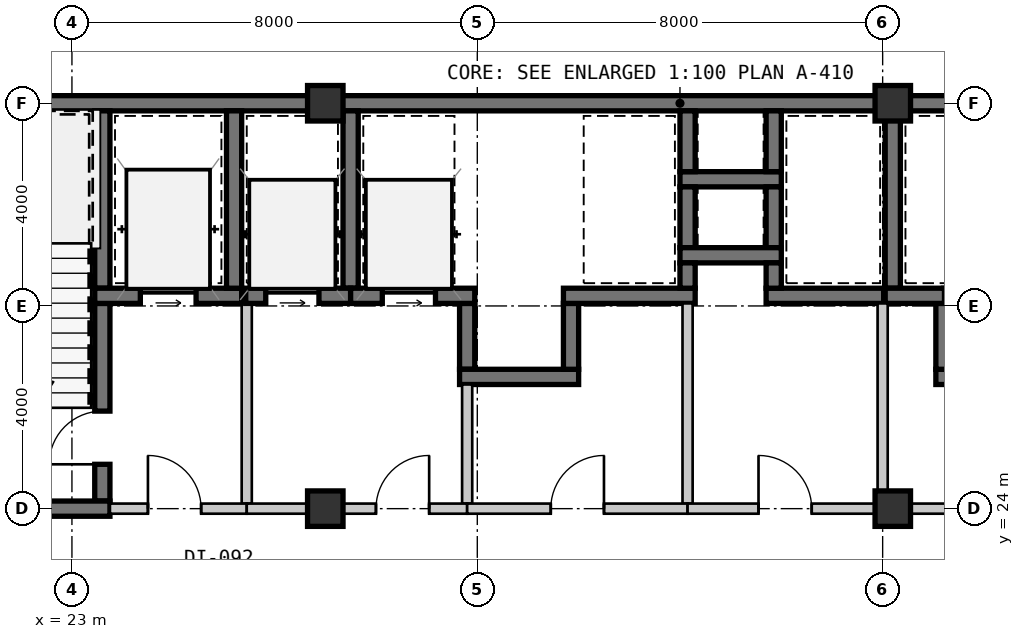
"""IFC4 building model, lengths in metres.
Left out: names, types, materials, properties, quantities, classifications, styles, units other than length and angle.
Written with IfcOpenShell. Run it as: python <this file> out.ifc"""

import sys

from ifc_helpers import new_model, si_unit, direction, frame, frame_2d, origin, origin_2d, place, context, subcontext, project, spatial, rectangle, extrude, source, transform, mapped, element, fill, save


model = new_model("IFC4")
c1 = context("Model", 3, precision=1e-05, world=origin(), true_north=direction((0.0, 1.0)))
c2 = subcontext(c1, "Body", "Model", "MODEL_VIEW")
j1 = project(units=[si_unit("LENGTHUNIT", "METRE"), si_unit("PLANEANGLEUNIT", "RADIAN")], contexts=[c1])
p1 = place(None, origin())
s1 = spatial("IfcSite", under=j1, at=p1, CompositionType="ELEMENT")
p2 = place(p1, origin())
s2 = spatial("IfcBuilding", under=s1, at=p2, CompositionType="ELEMENT")
p3 = place(p2, frame((0.0, 0.0, 74.55)))
s3 = spatial("IfcBuildingStorey", under=s2, at=p3, CompositionType="ELEMENT", Elevation=74.55)
m1 = source(origin(), c2, "Body", "SweptSolid", [
    extrude(rectangle(XDim=0.7, YDim=0.7, at=origin_2d()), origin(), (0.0, 0.0, 1.0), 3.15),
])
for number, where, z_axis, x_axis in (
    (1, (28.0, 24.0, 0.0), (0.0, 0.0, 1.0), (1.0, 0.0, 0.0)),
    (2, (39.2, 24.0, 0.0), (0.0, 0.0, 1.0), (1.0, 0.0, 0.0)),
    (3, (28.0, 32.0, 0.0), (0.0, 0.0, 1.0), (1.0, 0.0, 0.0)),
    (4, (39.2, 32.0, 0.0), (0.0, 0.0, 1.0), (1.0, 0.0, 0.0)),
):
    element("IfcColumn", number, at=place(p3, frame(where, z_axis=z_axis, x_axis=x_axis)), inside=s3, PredefinedType="COLUMN", context=c2, shape_type="MappedRepresentation", body=[
        mapped(m1, transform((0.0, 0.0, 0.0), scale=1.0)),
    ])
m2 = source(origin(), c2, "Body", "SweptSolid", [
    extrude(rectangle(XDim=9.15, YDim=0.3, at=frame_2d((4.575, 0.0))), origin(), (0.0, 0.0, 1.0), 2.93),
])
p4 = place(p3, frame((18.85, 32.0, 0.0), z_axis=(0.0, 0.0, 1.0), x_axis=(1.0, 0.0, 0.0)))
e5 = element("IfcWall", 5, at=p4, inside=s3, PredefinedType="SHEAR", context=c2, shape_type="MappedRepresentation", body=[
    mapped(m2, transform((0.0, 0.0, 0.0), scale=1.0)),
])
m3 = source(origin(), c2, "Body", "SweptSolid", [
    extrude(rectangle(XDim=11.2, YDim=0.3, at=frame_2d((5.6, 0.0))), origin(), (0.0, 0.0, 1.0), 2.93),
])
p5 = place(p3, frame((28.0, 32.0, 0.0), z_axis=(0.0, 0.0, 1.0), x_axis=(1.0, 0.0, 0.0)))
e6 = element("IfcWall", 6, at=p5, inside=s3, PredefinedType="SHEAR", context=c2, shape_type="MappedRepresentation", body=[
    mapped(m3, transform((0.0, 0.0, 0.0), scale=1.0)),
])
m4 = source(origin(), c2, "Body", "SweptSolid", [
    extrude(rectangle(XDim=11.95, YDim=0.3, at=frame_2d((5.975, 0.0))), origin(), (0.0, 0.0, 1.0), 2.93),
])
p6 = place(p3, frame((39.2, 32.0, 0.0), z_axis=(0.0, 0.0, 1.0), x_axis=(1.0, 0.0, 0.0)))
e7 = element("IfcWall", 7, at=p6, inside=s3, PredefinedType="SHEAR", context=c2, shape_type="MappedRepresentation", body=[
    mapped(m4, transform((0.0, 0.0, 0.0), scale=1.0)),
])
m5 = source(origin(), c2, "Body", "SweptSolid", [
    extrude(rectangle(XDim=3.5, YDim=0.3, at=frame_2d((1.75, 0.0))), origin(), (0.0, 0.0, 1.0), 2.93),
])
p7 = place(p3, frame((23.6, 28.35, 0.0), z_axis=(0.0, 0.0, 1.0), x_axis=(0.0, 1.0, 0.0)))
e8 = element("IfcWall", 8, at=p7, inside=s3, PredefinedType="SHEAR", context=c2, shape_type="MappedRepresentation", body=[
    mapped(m5, transform((0.0, 0.0, 0.0), scale=1.0)),
])
m6 = source(origin(), c2, "Body", "SweptSolid", [
    extrude(rectangle(XDim=3.9, YDim=0.3, at=frame_2d((1.95, 0.0))), origin(), (0.0, 0.0, 1.0), 2.93),
])
p8 = place(p3, frame((23.6, 24.15, 0.0), z_axis=(0.0, 0.0, 1.0), x_axis=(0.0, 1.0, 0.0)))
e9 = element("IfcWall", 9, at=p8, inside=s3, PredefinedType="SHEAR", context=c2, shape_type="MappedRepresentation", body=[
    mapped(m6, transform((0.0, 0.0, 0.0), scale=1.0)),
])
m7 = source(origin(), c2, "Body", "SweptSolid", [
    extrude(rectangle(XDim=1.05, YDim=2.1, at=frame_2d((0.525, 1.05))), frame((0.0, 0.16, 0.0), z_axis=(0.0, -1.0, 0.0), x_axis=(1.0, 0.0, 0.0)), (0.0, 0.0, 1.0), 0.32),
])
p9 = place(p8, frame((0.725, 0.0, 0.0)))
e10 = element("IfcOpeningElement", 10, at=p9, cuts=e9, PredefinedType="OPENING", context=c2, shape_type="MappedRepresentation", body=[
    mapped(m7, transform((0.0, 0.0, 0.0), scale=1.0)),
])
m8 = source(origin(), c2, "Body", "SweptSolid", [
    extrude(rectangle(XDim=4.9, YDim=0.3, at=frame_2d((2.45, 0.0))), origin(), (0.0, 0.0, 1.0), 2.93),
])
p10 = place(p3, frame((18.85, 24.0, 0.0), z_axis=(0.0, 0.0, 1.0), x_axis=(1.0, 0.0, 0.0)))
e11 = element("IfcWall", 11, at=p10, inside=s3, PredefinedType="SHEAR", context=c2, shape_type="MappedRepresentation", body=[
    mapped(m8, transform((0.0, 0.0, 0.0), scale=1.0)),
])
m9 = source(origin(), c2, "Body", "SweptSolid", [
    extrude(rectangle(XDim=2.9, YDim=0.3, at=frame_2d((1.45, 0.0))), origin(), (0.0, 0.0, 1.0), 2.93),
])
p11 = place(p3, frame((23.45, 28.2, 0.0), z_axis=(0.0, 0.0, 1.0), x_axis=(1.0, 0.0, 0.0)))
e12 = element("IfcWall", 12, at=p11, inside=s3, PredefinedType="SHEAR", context=c2, shape_type="MappedRepresentation", body=[
    mapped(m9, transform((0.0, 0.0, 0.0), scale=1.0)),
])
m10 = source(origin(), c2, "Body", "SweptSolid", [
    extrude(rectangle(XDim=1.1, YDim=2.15, at=frame_2d((0.55, 1.075))), frame((0.0, 0.16, 0.0), z_axis=(0.0, -1.0, 0.0), x_axis=(1.0, 0.0, 0.0)), (0.0, 0.0, 1.0), 0.32),
])
p12 = place(p11, frame((0.9, 0.0, 0.0)))
e13 = element("IfcOpeningElement", 13, at=p12, cuts=e12, PredefinedType="OPENING", context=c2, shape_type="MappedRepresentation", body=[
    mapped(m10, transform((0.0, 0.0, 0.0), scale=1.0)),
])
p13 = place(p3, frame((26.2, 28.35, 0.0), z_axis=(0.0, 0.0, 1.0), x_axis=(0.0, 1.0, 0.0)))
e14 = element("IfcWall", 14, at=p13, inside=s3, PredefinedType="SHEAR", context=c2, shape_type="MappedRepresentation", body=[
    mapped(m5, transform((0.0, 0.0, 0.0), scale=1.0)),
])
m11 = source(origin(), c2, "Body", "SweptSolid", [
    extrude(rectangle(XDim=3.95, YDim=0.2, at=frame_2d((1.975, 0.0))), origin(), (0.0, 0.0, 1.0), 2.93),
])
p14 = place(p3, frame((26.45, 24.1, 0.0), z_axis=(0.0, 0.0, 1.0), x_axis=(0.0, 1.0, 0.0)))
e15 = element("IfcWall", 15, at=p14, inside=s3, PredefinedType="SOLIDWALL", context=c2, shape_type="MappedRepresentation", body=[
    mapped(m11, transform((0.0, 0.0, 0.0), scale=1.0)),
])
m12 = source(origin(), c2, "Body", "SweptSolid", [
    extrude(rectangle(XDim=2.7, YDim=0.2, at=frame_2d((1.35, 0.0))), origin(), (0.0, 0.0, 1.0), 2.47),
])
p15 = place(p3, frame((23.75, 24.0, 0.0), z_axis=(0.0, 0.0, 1.0), x_axis=(1.0, 0.0, 0.0)))
e16 = element("IfcWall", 16, at=p15, inside=s3, PredefinedType="SOLIDWALL", context=c2, shape_type="MappedRepresentation", body=[
    mapped(m12, transform((0.0, 0.0, 0.0), scale=1.0)),
])
m13 = source(origin(), c2, "Body", "SweptSolid", [
    extrude(rectangle(XDim=1.05, YDim=2.1, at=frame_2d((0.525, 1.05))), frame((0.0, 0.11, 0.0), z_axis=(0.0, -1.0, 0.0), x_axis=(1.0, 0.0, 0.0)), (0.0, 0.0, 1.0), 0.22),
])
p16 = place(p15, frame((0.75, 0.0, 0.0)))
e17 = element("IfcOpeningElement", 17, at=p16, cuts=e16, PredefinedType="OPENING", context=c2, shape_type="MappedRepresentation", body=[
    mapped(m13, transform((0.0, 0.0, 0.0), scale=1.0)),
])
m14 = source(origin(), c2, "Body", "SweptSolid", [
    extrude(rectangle(XDim=2.0, YDim=0.3, at=frame_2d((1.0, 0.0))), origin(), (0.0, 0.0, 1.0), 2.93),
])
p17 = place(p3, frame((35.0, 30.5, 0.0), z_axis=(0.0, 0.0, 1.0), x_axis=(1.0, 0.0, 0.0)))
e18 = element("IfcWall", 18, at=p17, inside=s3, PredefinedType="SHEAR", context=c2, shape_type="MappedRepresentation", body=[
    mapped(m14, transform((0.0, 0.0, 0.0), scale=1.0)),
])
m15 = source(origin(), c2, "Body", "SweptSolid", [
    extrude(rectangle(XDim=1.2, YDim=0.3, at=frame_2d((0.6, 0.0))), origin(), (0.0, 0.0, 1.0), 2.93),
])
for number, where, z_axis, x_axis in (
    (19, (35.15, 31.85, 0.0), (0.0, 0.0, 1.0), (0.0, -1.0, 0.0)),
    (20, (36.85, 30.65, 0.0), (0.0, 0.0, 1.0), (0.0, 1.0, 0.0)),
    (21, (35.15, 30.35, 0.0), (0.0, 0.0, 1.0), (0.0, -1.0, 0.0)),
    (22, (36.85, 29.15, 0.0), (0.0, 0.0, 1.0), (0.0, 1.0, 0.0)),
):
    element("IfcWall", number, at=place(p3, frame(where, z_axis=z_axis, x_axis=x_axis)), inside=s3, PredefinedType="SHEAR", context=c2, shape_type="MappedRepresentation", body=[
        mapped(m15, transform((0.0, 0.0, 0.0), scale=1.0)),
    ])
p18 = place(p3, frame((35.0, 29.0, 0.0), z_axis=(0.0, 0.0, 1.0), x_axis=(1.0, 0.0, 0.0)))
e23 = element("IfcWall", 23, at=p18, inside=s3, PredefinedType="SHEAR", context=c2, shape_type="MappedRepresentation", body=[
    mapped(m14, transform((0.0, 0.0, 0.0), scale=1.0)),
])
m16 = source(origin(), c2, "Body", "SweptSolid", [
    extrude(rectangle(XDim=1.3, YDim=0.3, at=frame_2d((0.65, 0.0))), origin(), (0.0, 0.0, 1.0), 2.93),
])
p19 = place(p3, frame((30.8, 28.05, 0.0), z_axis=(0.0, 0.0, 1.0), x_axis=(0.0, -1.0, 0.0)))
e24 = element("IfcWall", 24, at=p19, inside=s3, PredefinedType="SHEAR", context=c2, shape_type="MappedRepresentation", body=[
    mapped(m16, transform((0.0, 0.0, 0.0), scale=1.0)),
])
m17 = source(origin(), c2, "Body", "SweptSolid", [
    extrude(rectangle(XDim=2.35, YDim=0.3, at=frame_2d((1.175, 0.0))), origin(), (0.0, 0.0, 1.0), 2.93),
])
p20 = place(p3, frame((30.65, 26.6, 0.0), z_axis=(0.0, 0.0, 1.0), x_axis=(1.0, 0.0, 0.0)))
e25 = element("IfcWall", 25, at=p20, inside=s3, PredefinedType="SHEAR", context=c2, shape_type="MappedRepresentation", body=[
    mapped(m17, transform((0.0, 0.0, 0.0), scale=1.0)),
])
p21 = place(p3, frame((32.85, 26.75, 0.0), z_axis=(0.0, 0.0, 1.0), x_axis=(0.0, 1.0, 0.0)))
e26 = element("IfcWall", 26, at=p21, inside=s3, PredefinedType="SHEAR", context=c2, shape_type="MappedRepresentation", body=[
    mapped(m16, transform((0.0, 0.0, 0.0), scale=1.0)),
])
m18 = source(origin(), c2, "Body", "SweptSolid", [
    extrude(rectangle(XDim=1.32, YDim=0.3, at=frame_2d((0.66, 0.0))), origin(), (0.0, 0.0, 1.0), 2.93),
])
p22 = place(p3, frame((41.52, 28.2, 0.0), z_axis=(0.0, 0.0, 1.0), x_axis=(-1.0, 0.0, 0.0)))
e27 = element("IfcWall", 27, at=p22, inside=s3, PredefinedType="SHEAR", context=c2, shape_type="MappedRepresentation", body=[
    mapped(m18, transform((0.0, 0.0, 0.0), scale=1.0)),
])
m19 = source(origin(), c2, "Body", "SweptSolid", [
    extrude(rectangle(XDim=2.25, YDim=0.3, at=frame_2d((1.125, 0.0))), origin(), (0.0, 0.0, 1.0), 2.93),
])
p23 = place(p3, frame((40.05, 26.6, 0.0), z_axis=(0.0, 0.0, 1.0), x_axis=(1.0, 0.0, 0.0)))
e28 = element("IfcWall", 28, at=p23, inside=s3, PredefinedType="SHEAR", context=c2, shape_type="MappedRepresentation", body=[
    mapped(m19, transform((0.0, 0.0, 0.0), scale=1.0)),
])
p24 = place(p3, frame((40.2, 28.05, 0.0), z_axis=(0.0, 0.0, 1.0), x_axis=(0.0, -1.0, 0.0)))
e29 = element("IfcWall", 29, at=p24, inside=s3, PredefinedType="SHEAR", context=c2, shape_type="MappedRepresentation", body=[
    mapped(m16, transform((0.0, 0.0, 0.0), scale=1.0)),
])
p25 = place(p3, frame((28.5, 28.35, 0.0), z_axis=(0.0, 0.0, 1.0), x_axis=(0.0, 1.0, 0.0)))
e30 = element("IfcWall", 30, at=p25, inside=s3, PredefinedType="SHEAR", context=c2, shape_type="MappedRepresentation", body=[
    mapped(m5, transform((0.0, 0.0, 0.0), scale=1.0)),
])
m20 = source(origin(), c2, "Body", "SweptSolid", [
    extrude(rectangle(XDim=2.07, YDim=0.3, at=frame_2d((1.035, 0.0))), origin(), (0.0, 0.0, 1.0), 2.93),
])
p26 = place(p3, frame((26.43, 28.2, 0.0), z_axis=(0.0, 0.0, 1.0), x_axis=(1.0, 0.0, 0.0)))
e31 = element("IfcWall", 31, at=p26, inside=s3, PredefinedType="SHEAR", context=c2, shape_type="MappedRepresentation", body=[
    mapped(m20, transform((0.0, 0.0, 0.0), scale=1.0)),
])
m21 = source(origin(), c2, "Body", "SweptSolid", [
    extrude(rectangle(XDim=1.05, YDim=2.15, at=frame_2d((0.525, 1.075))), frame((0.0, 0.16, 0.0), z_axis=(0.0, -1.0, 0.0), x_axis=(1.0, 0.0, 0.0)), (0.0, 0.0, 1.0), 0.32),
])
p27 = place(p26, frame((0.395, 0.0, 0.0)))
e32 = element("IfcOpeningElement", 32, at=p27, cuts=e31, PredefinedType="OPENING", context=c2, shape_type="MappedRepresentation", body=[
    mapped(m21, transform((0.0, 0.0, 0.0), scale=1.0)),
])
m22 = source(origin(), c2, "Body", "SweptSolid", [
    extrude(rectangle(XDim=2.45, YDim=0.3, at=frame_2d((1.225, 0.0))), origin(), (0.0, 0.0, 1.0), 2.93),
])
p28 = place(p3, frame((28.5, 28.2, 0.0), z_axis=(0.0, 0.0, 1.0), x_axis=(1.0, 0.0, 0.0)))
e33 = element("IfcWall", 33, at=p28, inside=s3, PredefinedType="SHEAR", context=c2, shape_type="MappedRepresentation", body=[
    mapped(m22, transform((0.0, 0.0, 0.0), scale=1.0)),
])
p29 = place(p28, frame((0.625, 0.0, 0.0)))
e34 = element("IfcOpeningElement", 34, at=p29, cuts=e33, PredefinedType="OPENING", context=c2, shape_type="MappedRepresentation", body=[
    mapped(m21, transform((0.0, 0.0, 0.0), scale=1.0)),
])
m23 = source(origin(), c2, "Body", "SweptSolid", [
    extrude(rectangle(XDim=2.35, YDim=0.2, at=frame_2d((1.175, 0.0))), origin(), (0.0, 0.0, 1.0), 2.93),
])
p30 = place(p3, frame((30.8, 26.45, 0.0), z_axis=(0.0, 0.0, 1.0), x_axis=(0.0, -1.0, 0.0)))
e35 = element("IfcWall", 35, at=p30, inside=s3, PredefinedType="SOLIDWALL", context=c2, shape_type="MappedRepresentation", body=[
    mapped(m23, transform((0.0, 0.0, 0.0), scale=1.0)),
])
m24 = source(origin(), c2, "Body", "SweptSolid", [
    extrude(rectangle(XDim=4.35, YDim=0.2, at=frame_2d((2.175, 0.0))), origin(), (0.0, 0.0, 1.0), 2.47),
])
p31 = place(p3, frame((30.8, 24.0, 0.0), z_axis=(0.0, 0.0, 1.0), x_axis=(-1.0, 0.0, 0.0)))
e36 = element("IfcWall", 36, at=p31, inside=s3, PredefinedType="SOLIDWALL", context=c2, shape_type="MappedRepresentation", body=[
    mapped(m24, transform((0.0, 0.0, 0.0), scale=1.0)),
])
p32 = place(p31, frame((0.75, 0.0, 0.0)))
e37 = element("IfcOpeningElement", 37, at=p32, cuts=e36, PredefinedType="OPENING", context=c2, shape_type="MappedRepresentation", body=[
    mapped(m13, transform((0.0, 0.0, 0.0), scale=1.0)),
])
m25 = source(origin(), c2, "Body", "SweptSolid", [
    extrude(rectangle(XDim=2.6, YDim=0.3, at=frame_2d((1.3, 0.0))), origin(), (0.0, 0.0, 1.0), 2.93),
])
p33 = place(p3, frame((32.7, 28.2, 0.0), z_axis=(0.0, 0.0, 1.0), x_axis=(1.0, 0.0, 0.0)))
e38 = element("IfcWall", 38, at=p33, inside=s3, PredefinedType="SHEAR", context=c2, shape_type="MappedRepresentation", body=[
    mapped(m25, transform((0.0, 0.0, 0.0), scale=1.0)),
])
m26 = source(origin(), c2, "Body", "SweptSolid", [
    extrude(rectangle(XDim=0.5, YDim=0.3, at=frame_2d((0.25, 0.0))), origin(), (0.0, 0.0, 1.0), 2.93),
])
p34 = place(p3, frame((35.15, 28.35, 0.0), z_axis=(0.0, 0.0, 1.0), x_axis=(0.0, 1.0, 0.0)))
e39 = element("IfcWall", 39, at=p34, inside=s3, PredefinedType="SHEAR", context=c2, shape_type="MappedRepresentation", body=[
    mapped(m26, transform((0.0, 0.0, 0.0), scale=1.0)),
])
p35 = place(p3, frame((39.2, 28.35, 0.0), z_axis=(0.0, 0.0, 1.0), x_axis=(0.0, 1.0, 0.0)))
e40 = element("IfcWall", 40, at=p35, inside=s3, PredefinedType="SHEAR", context=c2, shape_type="MappedRepresentation", body=[
    mapped(m5, transform((0.0, 0.0, 0.0), scale=1.0)),
])
m27 = source(origin(), c2, "Body", "SweptSolid", [
    extrude(rectangle(XDim=2.32, YDim=0.3, at=frame_2d((1.16, 0.0))), origin(), (0.0, 0.0, 1.0), 2.93),
])
p36 = place(p3, frame((36.7, 28.2, 0.0), z_axis=(0.0, 0.0, 1.0), x_axis=(1.0, 0.0, 0.0)))
e41 = element("IfcWall", 41, at=p36, inside=s3, PredefinedType="SHEAR", context=c2, shape_type="MappedRepresentation", body=[
    mapped(m27, transform((0.0, 0.0, 0.0), scale=1.0)),
])
p37 = place(p3, frame((36.85, 28.85, 0.0), z_axis=(0.0, 0.0, 1.0), x_axis=(0.0, -1.0, 0.0)))
e42 = element("IfcWall", 42, at=p37, inside=s3, PredefinedType="SHEAR", context=c2, shape_type="MappedRepresentation", body=[
    mapped(m26, transform((0.0, 0.0, 0.0), scale=1.0)),
])
m28 = source(origin(), c2, "Body", "SweptSolid", [
    extrude(rectangle(XDim=1.17, YDim=0.3, at=frame_2d((0.585, 0.0))), origin(), (0.0, 0.0, 1.0), 2.93),
])
p38 = place(p3, frame((39.05, 28.2, 0.0), z_axis=(0.0, 0.0, 1.0), x_axis=(1.0, 0.0, 0.0)))
e43 = element("IfcWall", 43, at=p38, inside=s3, PredefinedType="SHEAR", context=c2, shape_type="MappedRepresentation", body=[
    mapped(m28, transform((0.0, 0.0, 0.0), scale=1.0)),
])
p39 = place(p3, frame((35.15, 28.05, 0.0), z_axis=(0.0, 0.0, 1.0), x_axis=(0.0, -1.0, 0.0)))
e44 = element("IfcWall", 44, at=p39, inside=s3, PredefinedType="SOLIDWALL", context=c2, shape_type="MappedRepresentation", body=[
    mapped(m11, transform((0.0, 0.0, 0.0), scale=1.0)),
])
m29 = source(origin(), c2, "Body", "SweptSolid", [
    extrude(rectangle(XDim=4.35, YDim=0.2, at=frame_2d((2.175, 0.0))), origin(), (0.0, 0.0, 1.0), 2.47),
])
p40 = place(p3, frame((35.15, 24.0, 0.0), z_axis=(0.0, 0.0, 1.0), x_axis=(-1.0, 0.0, 0.0)))
e45 = element("IfcWall", 45, at=p40, inside=s3, PredefinedType="SOLIDWALL", context=c2, shape_type="MappedRepresentation", body=[
    mapped(m29, transform((0.0, 0.0, 0.0), scale=1.0)),
])
p41 = place(p40, frame((1.65, 0.0, 0.0)))
e46 = element("IfcOpeningElement", 46, at=p41, cuts=e45, PredefinedType="OPENING", context=c2, shape_type="MappedRepresentation", body=[
    mapped(m13, transform((0.0, 0.0, 0.0), scale=1.0)),
])
p42 = place(p3, frame((39.0, 28.05, 0.0), z_axis=(0.0, 0.0, 1.0), x_axis=(0.0, -1.0, 0.0)))
e47 = element("IfcWall", 47, at=p42, inside=s3, PredefinedType="SOLIDWALL", context=c2, shape_type="MappedRepresentation", body=[
    mapped(m11, transform((0.0, 0.0, 0.0), scale=1.0)),
])
m30 = source(origin(), c2, "Body", "SweptSolid", [
    extrude(rectangle(XDim=3.85, YDim=0.2, at=frame_2d((1.925, 0.0))), origin(), (0.0, 0.0, 1.0), 2.47),
])
p43 = place(p3, frame((39.0, 24.0, 0.0), z_axis=(0.0, 0.0, 1.0), x_axis=(-1.0, 0.0, 0.0)))
e48 = element("IfcWall", 48, at=p43, inside=s3, PredefinedType="SOLIDWALL", context=c2, shape_type="MappedRepresentation", body=[
    mapped(m30, transform((0.0, 0.0, 0.0), scale=1.0)),
])
p44 = place(p43, frame((1.4, 0.0, 0.0)))
e49 = element("IfcOpeningElement", 49, at=p44, cuts=e48, PredefinedType="OPENING", context=c2, shape_type="MappedRepresentation", body=[
    mapped(m13, transform((0.0, 0.0, 0.0), scale=1.0)),
])
m31 = source(origin(), c2, "Body", "SweptSolid", [
    extrude(rectangle(XDim=4.55, YDim=0.2, at=frame_2d((2.275, 0.0))), origin(), (0.0, 0.0, 1.0), 2.397),
])
p45 = place(p3, frame((43.55, 24.0, 0.0), z_axis=(0.0, 0.0, 1.0), x_axis=(-1.0, 0.0, 0.0)))
e50 = element("IfcWall", 50, at=p45, inside=s3, PredefinedType="SOLIDWALL", context=c2, shape_type="MappedRepresentation", body=[
    mapped(m31, transform((0.0, 0.0, 0.0), scale=1.0)),
])
p46 = place(p45, frame((1.75, 0.0, 0.0)))
e51 = element("IfcOpeningElement", 51, at=p46, cuts=e50, PredefinedType="OPENING", context=c2, shape_type="MappedRepresentation", body=[
    mapped(m13, transform((0.0, 0.0, 0.0), scale=1.0)),
])
m32 = source(origin(), c2, "Body", "SweptSolid", [
    extrude(rectangle(XDim=1.05, YDim=2.1, at=frame_2d((0.525, 1.05))), frame((0.0, 0.025, 0.0), z_axis=(0.0, -1.0, 0.0), x_axis=(1.0, 0.0, 0.0)), (0.0, 0.0, 1.0), 0.05),
])
p47 = place(p9, origin())
e52 = element("IfcDoor", 52, at=p47, inside=s3, OperationType="SINGLE_SWING_LEFT", PredefinedType="DOOR", context=c2, shape_type="MappedRepresentation", body=[
    mapped(m32, transform((0.0, 0.0, 0.0), scale=1.0)),
])
fill(e10, e52)
m33 = source(origin(), c2, "Body", "SweptSolid", [
    extrude(rectangle(XDim=1.1, YDim=2.15, at=frame_2d((0.55, 1.075))), frame((0.0, 0.025, 0.0), z_axis=(0.0, -1.0, 0.0), x_axis=(1.0, 0.0, 0.0)), (0.0, 0.0, 1.0), 0.05),
])
p48 = place(p12, origin())
e53 = element("IfcDoor", 53, at=p48, inside=s3, OperationType="SLIDING_TO_LEFT", PredefinedType="DOOR", context=c2, shape_type="MappedRepresentation", body=[
    mapped(m33, transform((0.0, 0.0, 0.0), scale=1.0)),
])
fill(e13, e53)
p49 = place(p16, origin())
e54 = element("IfcDoor", 54, at=p49, inside=s3, OperationType="SINGLE_SWING_LEFT", PredefinedType="DOOR", context=c2, shape_type="MappedRepresentation", body=[
    mapped(m32, transform((0.0, 0.0, 0.0), scale=1.0)),
])
fill(e17, e54)
m34 = source(origin(), c2, "Body", "SweptSolid", [
    extrude(rectangle(XDim=1.05, YDim=2.15, at=frame_2d((0.525, 1.075))), frame((0.0, 0.025, 0.0), z_axis=(0.0, -1.0, 0.0), x_axis=(1.0, 0.0, 0.0)), (0.0, 0.0, 1.0), 0.05),
])
p50 = place(p27, origin())
e55 = element("IfcDoor", 55, at=p50, inside=s3, OperationType="SLIDING_TO_LEFT", PredefinedType="DOOR", context=c2, shape_type="MappedRepresentation", body=[
    mapped(m34, transform((0.0, 0.0, 0.0), scale=1.0)),
])
fill(e32, e55)
p51 = place(p29, origin())
e56 = element("IfcDoor", 56, at=p51, inside=s3, OperationType="SLIDING_TO_LEFT", PredefinedType="DOOR", context=c2, shape_type="MappedRepresentation", body=[
    mapped(m34, transform((0.0, 0.0, 0.0), scale=1.0)),
])
fill(e34, e56)
p52 = place(p32, frame((1.05, 0.0, 0.0), z_axis=(0.0, 0.0, 1.0), x_axis=(-1.0, 0.0, 0.0)))
e57 = element("IfcDoor", 57, at=p52, inside=s3, OperationType="SINGLE_SWING_RIGHT", PredefinedType="DOOR", context=c2, shape_type="MappedRepresentation", body=[
    mapped(m32, transform((0.0, 0.0, 0.0), scale=1.0)),
])
fill(e37, e57)
p53 = place(p41, frame((1.05, 0.0, 0.0), z_axis=(0.0, 0.0, 1.0), x_axis=(-1.0, 0.0, 0.0)))
e58 = element("IfcDoor", 58, at=p53, inside=s3, OperationType="SINGLE_SWING_RIGHT", PredefinedType="DOOR", context=c2, shape_type="MappedRepresentation", body=[
    mapped(m32, transform((0.0, 0.0, 0.0), scale=1.0)),
])
fill(e46, e58)
p54 = place(p44, frame((1.05, 0.0, 0.0), z_axis=(0.0, 0.0, 1.0), x_axis=(-1.0, 0.0, 0.0)))
e59 = element("IfcDoor", 59, at=p54, inside=s3, OperationType="SINGLE_SWING_LEFT", PredefinedType="DOOR", context=c2, shape_type="MappedRepresentation", body=[
    mapped(m32, transform((0.0, 0.0, 0.0), scale=1.0)),
])
fill(e49, e59)
save(model, sys.argv[1])
